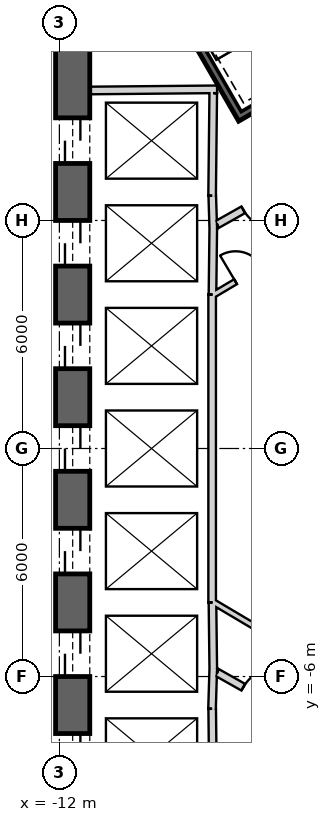
"""IFC4 building model, lengths in metres.
Left out: names, types, materials, properties, quantities, classifications, styles, units other than length and angle.
Written with IfcOpenShell. Run it as: python <this file> out.ifc"""

import sys

from ifc_helpers import new_model, si_unit, direction, frame, frame_2d, origin, place, context, subcontext, project, spatial, rectangle, extrude, element, fill, save


model = new_model("IFC4")
c1 = context("Model", 3, precision=1e-05, world=origin(), true_north=direction((0.0, 1.0)))
c2 = subcontext(c1, "Body", "Model", "MODEL_VIEW")
j1 = project(units=[si_unit("LENGTHUNIT", "METRE"), si_unit("PLANEANGLEUNIT", "RADIAN")], contexts=[c1])
p1 = place(None, origin())
s1 = spatial("IfcSite", under=j1, at=p1, CompositionType="ELEMENT")
p2 = place(p1, origin())
s2 = spatial("IfcBuilding", under=s1, at=p2, CompositionType="ELEMENT")
p3 = place(p2, origin())
s3 = spatial("IfcBuildingStorey", under=s2, at=p3, CompositionType="ELEMENT", Elevation=0.0)
p4 = place(p3, frame((19.475, 2.208, 0.0), z_axis=(0.0, 0.0, 1.0), x_axis=(-0.866028369851, 0.499994862586, 0.0)))
e1 = element("IfcWall", 1, at=p4, inside=s3, PredefinedType="SHEAR", context=c2, shape_type="SweptSolid", body=[
    extrude(rectangle(XDim=31.523, YDim=0.9, at=frame_2d((15.762, 0.0))), origin(), (0.0, 0.0, 1.0), 9.0),
])
p5 = place(p4, frame((7.062, 0.0, 0.0)))
e2 = element("IfcOpeningElement", 2, at=p5, cuts=e1, PredefinedType="OPENING", context=c2, shape_type="SweptSolid", body=[
    extrude(rectangle(XDim=1.2, YDim=2.4, at=frame_2d((0.6, 1.2))), frame((0.0, 0.46, 0.0), z_axis=(0.0, -1.0, 0.0), x_axis=(1.0, 0.0, 0.0)), (0.0, 0.0, 1.0), 0.92),
])
p6 = place(p4, frame((9.762, 0.0, 0.0)))
e3 = element("IfcOpeningElement", 3, at=p6, cuts=e1, PredefinedType="OPENING", context=c2, shape_type="SweptSolid", body=[
    extrude(rectangle(XDim=1.2, YDim=2.4, at=frame_2d((0.6, 1.2))), frame((0.0, 0.46, 0.0), z_axis=(0.0, -1.0, 0.0), x_axis=(1.0, 0.0, 0.0)), (0.0, 0.0, 1.0), 0.92),
])
p7 = place(p4, frame((12.462, 0.0, 0.0)))
e4 = element("IfcOpeningElement", 4, at=p7, cuts=e1, PredefinedType="OPENING", context=c2, shape_type="SweptSolid", body=[
    extrude(rectangle(XDim=1.2, YDim=2.4, at=frame_2d((0.6, 1.2))), frame((0.0, 0.46, 0.0), z_axis=(0.0, -1.0, 0.0), x_axis=(1.0, 0.0, 0.0)), (0.0, 0.0, 1.0), 0.92),
])
p8 = place(p4, frame((15.162, 0.0, 0.0)))
e5 = element("IfcOpeningElement", 5, at=p8, cuts=e1, PredefinedType="OPENING", context=c2, shape_type="SweptSolid", body=[
    extrude(rectangle(XDim=1.2, YDim=2.4, at=frame_2d((0.6, 1.2))), frame((0.0, 0.46, 0.0), z_axis=(0.0, -1.0, 0.0), x_axis=(1.0, 0.0, 0.0)), (0.0, 0.0, 1.0), 0.92),
])
p9 = place(p4, frame((17.862, 0.0, 0.0)))
e6 = element("IfcOpeningElement", 6, at=p9, cuts=e1, PredefinedType="OPENING", context=c2, shape_type="SweptSolid", body=[
    extrude(rectangle(XDim=1.2, YDim=2.4, at=frame_2d((0.6, 1.2))), frame((0.0, 0.46, 0.0), z_axis=(0.0, -1.0, 0.0), x_axis=(1.0, 0.0, 0.0)), (0.0, 0.0, 1.0), 0.92),
])
p10 = place(p4, frame((20.562, 0.0, 0.0)))
e7 = element("IfcOpeningElement", 7, at=p10, cuts=e1, PredefinedType="OPENING", context=c2, shape_type="SweptSolid", body=[
    extrude(rectangle(XDim=1.2, YDim=2.4, at=frame_2d((0.6, 1.2))), frame((0.0, 0.46, 0.0), z_axis=(0.0, -1.0, 0.0), x_axis=(1.0, 0.0, 0.0)), (0.0, 0.0, 1.0), 0.92),
])
p11 = place(p4, frame((23.262, 0.0, 0.0)))
e8 = element("IfcOpeningElement", 8, at=p11, cuts=e1, PredefinedType="OPENING", context=c2, shape_type="SweptSolid", body=[
    extrude(rectangle(XDim=1.2, YDim=2.4, at=frame_2d((0.6, 1.2))), frame((0.0, 0.46, 0.0), z_axis=(0.0, -1.0, 0.0), x_axis=(1.0, 0.0, 0.0)), (0.0, 0.0, 1.0), 0.92),
])
p12 = place(p4, frame((3.612, 0.0, 0.0)))
e9 = element("IfcOpeningElement", 9, at=p12, cuts=e1, PredefinedType="OPENING", context=c2, shape_type="SweptSolid", body=[
    extrude(rectangle(XDim=1.2, YDim=2.4, at=frame_2d((0.6, 1.2))), frame((0.0, 0.46, 0.0), z_axis=(0.0, -1.0, 0.0), x_axis=(1.0, 0.0, 0.0)), (0.0, 0.0, 1.0), 0.92),
])
p13 = place(p4, frame((26.712, 0.0, 0.0)))
e10 = element("IfcOpeningElement", 10, at=p13, cuts=e1, PredefinedType="OPENING", context=c2, shape_type="SweptSolid", body=[
    extrude(rectangle(XDim=1.2, YDim=2.4, at=frame_2d((0.6, 1.2))), frame((0.0, 0.46, 0.0), z_axis=(0.0, -1.0, 0.0), x_axis=(1.0, 0.0, 0.0)), (0.0, 0.0, 1.0), 0.92),
])
p14 = place(p3, frame((-11.65, 15.762, 0.0), z_axis=(0.0, 0.0, 1.0), x_axis=(0.0, -1.0, 0.0)))
e11 = element("IfcWall", 11, at=p14, inside=s3, PredefinedType="SHEAR", context=c2, shape_type="SweptSolid", body=[
    extrude(rectangle(XDim=31.523, YDim=0.9, at=frame_2d((15.762, 0.0))), origin(), (0.0, 0.0, 1.0), 9.0),
])
p15 = place(p14, frame((7.062, 0.0, 0.0)))
e12 = element("IfcOpeningElement", 12, at=p15, cuts=e11, PredefinedType="OPENING", context=c2, shape_type="SweptSolid", body=[
    extrude(rectangle(XDim=1.2, YDim=2.4, at=frame_2d((0.6, 1.2))), frame((0.0, 0.46, 0.0), z_axis=(0.0, -1.0, 0.0), x_axis=(1.0, 0.0, 0.0)), (0.0, 0.0, 1.0), 0.92),
])
p16 = place(p14, frame((9.762, 0.0, 0.0)))
e13 = element("IfcOpeningElement", 13, at=p16, cuts=e11, PredefinedType="OPENING", context=c2, shape_type="SweptSolid", body=[
    extrude(rectangle(XDim=1.2, YDim=2.4, at=frame_2d((0.6, 1.2))), frame((0.0, 0.46, 0.0), z_axis=(0.0, -1.0, 0.0), x_axis=(1.0, 0.0, 0.0)), (0.0, 0.0, 1.0), 0.92),
])
p17 = place(p14, frame((12.462, 0.0, 0.0)))
e14 = element("IfcOpeningElement", 14, at=p17, cuts=e11, PredefinedType="OPENING", context=c2, shape_type="SweptSolid", body=[
    extrude(rectangle(XDim=1.2, YDim=2.4, at=frame_2d((0.6, 1.2))), frame((0.0, 0.46, 0.0), z_axis=(0.0, -1.0, 0.0), x_axis=(1.0, 0.0, 0.0)), (0.0, 0.0, 1.0), 0.92),
])
p18 = place(p14, frame((15.162, 0.0, 0.0)))
e15 = element("IfcOpeningElement", 15, at=p18, cuts=e11, PredefinedType="OPENING", context=c2, shape_type="SweptSolid", body=[
    extrude(rectangle(XDim=1.2, YDim=2.4, at=frame_2d((0.6, 1.2))), frame((0.0, 0.46, 0.0), z_axis=(0.0, -1.0, 0.0), x_axis=(1.0, 0.0, 0.0)), (0.0, 0.0, 1.0), 0.92),
])
p19 = place(p14, frame((17.862, 0.0, 0.0)))
e16 = element("IfcOpeningElement", 16, at=p19, cuts=e11, PredefinedType="OPENING", context=c2, shape_type="SweptSolid", body=[
    extrude(rectangle(XDim=1.2, YDim=2.4, at=frame_2d((0.6, 1.2))), frame((0.0, 0.46, 0.0), z_axis=(0.0, -1.0, 0.0), x_axis=(1.0, 0.0, 0.0)), (0.0, 0.0, 1.0), 0.92),
])
p20 = place(p14, frame((20.562, 0.0, 0.0)))
e17 = element("IfcOpeningElement", 17, at=p20, cuts=e11, PredefinedType="OPENING", context=c2, shape_type="SweptSolid", body=[
    extrude(rectangle(XDim=1.2, YDim=2.4, at=frame_2d((0.6, 1.2))), frame((0.0, 0.46, 0.0), z_axis=(0.0, -1.0, 0.0), x_axis=(1.0, 0.0, 0.0)), (0.0, 0.0, 1.0), 0.92),
])
p21 = place(p14, frame((23.262, 0.0, 0.0)))
e18 = element("IfcOpeningElement", 18, at=p21, cuts=e11, PredefinedType="OPENING", context=c2, shape_type="SweptSolid", body=[
    extrude(rectangle(XDim=1.2, YDim=2.4, at=frame_2d((0.6, 1.2))), frame((0.0, 0.46, 0.0), z_axis=(0.0, -1.0, 0.0), x_axis=(1.0, 0.0, 0.0)), (0.0, 0.0, 1.0), 0.92),
])
p22 = place(p14, frame((3.612, 0.0, 0.0)))
e19 = element("IfcOpeningElement", 19, at=p22, cuts=e11, PredefinedType="OPENING", context=c2, shape_type="SweptSolid", body=[
    extrude(rectangle(XDim=1.2, YDim=2.4, at=frame_2d((0.6, 1.2))), frame((0.0, 0.46, 0.0), z_axis=(0.0, -1.0, 0.0), x_axis=(1.0, 0.0, 0.0)), (0.0, 0.0, 1.0), 0.92),
])
p23 = place(p14, frame((26.712, 0.0, 0.0)))
e20 = element("IfcOpeningElement", 20, at=p23, cuts=e11, PredefinedType="OPENING", context=c2, shape_type="SweptSolid", body=[
    extrude(rectangle(XDim=1.2, YDim=2.4, at=frame_2d((0.6, 1.2))), frame((0.0, 0.46, 0.0), z_axis=(0.0, -1.0, 0.0), x_axis=(1.0, 0.0, 0.0)), (0.0, 0.0, 1.0), 0.92),
])
p24 = place(p3, frame((-7.825, -17.97, 0.0), z_axis=(0.0, 0.0, 1.0), x_axis=(0.866028369851, 0.499994862586, 0.0)))
e21 = element("IfcWall", 21, at=p24, inside=s3, PredefinedType="SHEAR", context=c2, shape_type="SweptSolid", body=[
    extrude(rectangle(XDim=31.523, YDim=0.9, at=frame_2d((15.762, 0.0))), origin(), (0.0, 0.0, 1.0), 9.0),
])
p25 = place(p24, frame((7.062, 0.0, 0.0)))
e22 = element("IfcOpeningElement", 22, at=p25, cuts=e21, PredefinedType="OPENING", context=c2, shape_type="SweptSolid", body=[
    extrude(rectangle(XDim=1.2, YDim=2.4, at=frame_2d((0.6, 1.2))), frame((0.0, 0.46, 0.0), z_axis=(0.0, -1.0, 0.0), x_axis=(1.0, 0.0, 0.0)), (0.0, 0.0, 1.0), 0.92),
])
p26 = place(p24, frame((9.762, 0.0, 0.0)))
e23 = element("IfcOpeningElement", 23, at=p26, cuts=e21, PredefinedType="OPENING", context=c2, shape_type="SweptSolid", body=[
    extrude(rectangle(XDim=1.2, YDim=2.4, at=frame_2d((0.6, 1.2))), frame((0.0, 0.46, 0.0), z_axis=(0.0, -1.0, 0.0), x_axis=(1.0, 0.0, 0.0)), (0.0, 0.0, 1.0), 0.92),
])
p27 = place(p24, frame((12.462, 0.0, 0.0)))
e24 = element("IfcOpeningElement", 24, at=p27, cuts=e21, PredefinedType="OPENING", context=c2, shape_type="SweptSolid", body=[
    extrude(rectangle(XDim=1.2, YDim=2.4, at=frame_2d((0.6, 1.2))), frame((0.0, 0.46, 0.0), z_axis=(0.0, -1.0, 0.0), x_axis=(1.0, 0.0, 0.0)), (0.0, 0.0, 1.0), 0.92),
])
p28 = place(p24, frame((15.162, 0.0, 0.0)))
e25 = element("IfcOpeningElement", 25, at=p28, cuts=e21, PredefinedType="OPENING", context=c2, shape_type="SweptSolid", body=[
    extrude(rectangle(XDim=1.2, YDim=2.4, at=frame_2d((0.6, 1.2))), frame((0.0, 0.46, 0.0), z_axis=(0.0, -1.0, 0.0), x_axis=(1.0, 0.0, 0.0)), (0.0, 0.0, 1.0), 0.92),
])
p29 = place(p24, frame((17.862, 0.0, 0.0)))
e26 = element("IfcOpeningElement", 26, at=p29, cuts=e21, PredefinedType="OPENING", context=c2, shape_type="SweptSolid", body=[
    extrude(rectangle(XDim=1.2, YDim=2.4, at=frame_2d((0.6, 1.2))), frame((0.0, 0.46, 0.0), z_axis=(0.0, -1.0, 0.0), x_axis=(1.0, 0.0, 0.0)), (0.0, 0.0, 1.0), 0.92),
])
p30 = place(p24, frame((20.562, 0.0, 0.0)))
e27 = element("IfcOpeningElement", 27, at=p30, cuts=e21, PredefinedType="OPENING", context=c2, shape_type="SweptSolid", body=[
    extrude(rectangle(XDim=1.2, YDim=2.4, at=frame_2d((0.6, 1.2))), frame((0.0, 0.46, 0.0), z_axis=(0.0, -1.0, 0.0), x_axis=(1.0, 0.0, 0.0)), (0.0, 0.0, 1.0), 0.92),
])
p31 = place(p24, frame((26.712, 0.0, 0.0)))
e28 = element("IfcOpeningElement", 28, at=p31, cuts=e21, PredefinedType="OPENING", context=c2, shape_type="SweptSolid", body=[
    extrude(rectangle(XDim=1.2, YDim=2.4, at=frame_2d((0.6, 1.2))), frame((0.0, 0.46, 0.0), z_axis=(0.0, -1.0, 0.0), x_axis=(1.0, 0.0, 0.0)), (0.0, 0.0, 1.0), 0.92),
])
p32 = place(p24, frame((3.612, 0.0, 0.0)))
e29 = element("IfcOpeningElement", 29, at=p32, cuts=e21, PredefinedType="OPENING", context=c2, shape_type="SweptSolid", body=[
    extrude(rectangle(XDim=1.2, YDim=2.4, at=frame_2d((0.6, 1.2))), frame((0.0, 0.46, 0.0), z_axis=(0.0, -1.0, 0.0), x_axis=(1.0, 0.0, 0.0)), (0.0, 0.0, 1.0), 0.92),
])
p33 = place(p3, frame((-11.2, 9.42, 0.0), z_axis=(0.0, 0.0, 1.0), x_axis=(0.999957167047, 0.009255488683, 0.0)))
e30 = element("IfcWall", 30, at=p33, inside=s3, PredefinedType="PLUMBINGWALL", context=c2, shape_type="SweptSolid", body=[
    extrude(rectangle(XDim=3.35, YDim=0.2, at=frame_2d((1.675, 0.0))), origin(), (0.0, 0.0, 1.0), 8.7),
])
p34 = place(p3, frame((-7.951, 9.35, 0.0), z_axis=(0.0, 0.0, 1.0), x_axis=(-0.011120469654, -0.999938165666, 0.0)))
e31 = element("IfcWall", 31, at=p34, inside=s3, PredefinedType="PLUMBINGWALL", context=c2, shape_type="SweptSolid", body=[
    extrude(rectangle(XDim=2.7, YDim=0.2, at=frame_2d((1.35, 0.0))), origin(), (0.0, 0.0, 1.0), 8.7),
])
p35 = place(p3, frame((-7.977, 6.65, 0.0), z_axis=(0.0, 0.0, 1.0), x_axis=(0.030861509705, -0.999523670164, 0.0)))
e32 = element("IfcWall", 32, at=p35, inside=s3, PredefinedType="PLUMBINGWALL", context=c2, shape_type="SweptSolid", body=[
    extrude(rectangle(XDim=0.878, YDim=0.2, at=frame_2d((0.439, 0.0))), origin(), (0.0, 0.0, 1.0), 8.7),
])
p36 = place(p3, frame((-7.949, 5.895, 0.0), z_axis=(0.0, 0.0, 1.0), x_axis=(-0.012042535896, -0.999927486035, 0.0)))
e33 = element("IfcWall", 33, at=p36, inside=s3, PredefinedType="PLUMBINGWALL", context=c2, shape_type="SweptSolid", body=[
    extrude(rectangle(XDim=1.845, YDim=0.2, at=frame_2d((0.922, 0.0))), origin(), (0.0, 0.0, 1.0), 8.7),
])
p37 = place(p3, frame((-7.98, 4.05, 0.0), z_axis=(0.0, 0.0, 1.0), x_axis=(0.0, -1.0, 0.0)))
e34 = element("IfcWall", 34, at=p37, inside=s3, PredefinedType="PLUMBINGWALL", context=c2, shape_type="SweptSolid", body=[
    extrude(rectangle(XDim=8.1, YDim=0.2, at=frame_2d((4.05, 0.0))), origin(), (0.0, 0.0, 1.0), 8.7),
])
p38 = place(p3, frame((-7.95, -5.772, 0.0), z_axis=(0.0, 0.0, 1.0), x_axis=(-0.030803413295, -0.999525462272, 0.0)))
e35 = element("IfcWall", 35, at=p38, inside=s3, PredefinedType="PLUMBINGWALL", context=c2, shape_type="SweptSolid", body=[
    extrude(rectangle(XDim=1.078, YDim=0.2, at=frame_2d((0.539, 0.0))), origin(), (0.0, 0.0, 1.0), 8.7),
])
p39 = place(p3, frame((-7.971, -4.05, 0.0), z_axis=(0.0, 0.0, 1.0), x_axis=(0.012042535896, -0.999927486035, 0.0)))
e36 = element("IfcWall", 36, at=p39, inside=s3, PredefinedType="PLUMBINGWALL", context=c2, shape_type="SweptSolid", body=[
    extrude(rectangle(XDim=1.845, YDim=0.2, at=frame_2d((0.922, 0.0))), origin(), (0.0, 0.0, 1.0), 8.7),
])
p40 = place(p3, frame((-7.979, -6.85, 0.0), z_axis=(0.0, 0.0, 1.0), x_axis=(0.011121475088, -0.999938154483, 0.0)))
e37 = element("IfcWall", 37, at=p40, inside=s3, PredefinedType="PLUMBINGWALL", context=c2, shape_type="SweptSolid", body=[
    extrude(rectangle(XDim=2.7, YDim=0.2, at=frame_2d((1.35, 0.0))), origin(), (0.0, 0.0, 1.0), 8.7),
])
p41 = place(p3, frame((-11.245, 15.678, -0.4), z_axis=(0.0, 0.0, 1.0), x_axis=(0.499977274689, -0.866038523851, 0.0)))
e38 = element("IfcWall", 38, at=p41, inside=s3, PredefinedType="SHEAR", context=c2, shape_type="SweptSolid", body=[
    extrude(rectangle(XDim=8.1, YDim=0.2, at=frame_2d((4.05, 0.0))), origin(), (0.0, 0.0, 1.0), 9.1),
])
p42 = place(p3, frame((-7.159, 8.8, -0.4), z_axis=(0.0, 0.0, 1.0), x_axis=(0.866047807691, 0.499961193289, 0.0)))
e39 = element("IfcWall", 39, at=p42, inside=s3, PredefinedType="SHEAR", context=c2, shape_type="SweptSolid", body=[
    extrude(rectangle(XDim=3.6, YDim=0.2, at=frame_2d((1.8, 0.0))), origin(), (0.0, 0.0, 1.0), 9.1),
])
p43 = place(p42, frame((1.25, 0.0, 0.4)))
e40 = element("IfcOpeningElement", 40, at=p43, cuts=e39, PredefinedType="OPENING", context=c2, shape_type="SweptSolid", body=[
    extrude(rectangle(XDim=1.1, YDim=2.1, at=frame_2d((0.55, 1.05))), frame((0.0, 0.11, 0.0), z_axis=(0.0, -1.0, 0.0), x_axis=(1.0, 0.0, 0.0)), (0.0, 0.0, 1.0), 0.22),
])
p44 = place(p3, frame((-5.6, 7.16, 0.0), z_axis=(0.0, 0.0, 1.0), x_axis=(-0.871363259478, -0.490638431059, 0.0)))
e41 = element("IfcWall", 41, at=p44, inside=s3, PredefinedType="PARTITIONING", context=c2, shape_type="SweptSolid", body=[
    extrude(rectangle(XDim=2.581, YDim=0.2, at=frame_2d((1.291, 0.0))), origin(), (0.0, 0.0, 1.0), 8.7),
])
p45 = place(p44, frame((0.791, 0.0, 0.0)))
e42 = element("IfcOpeningElement", 42, at=p45, cuts=e41, PredefinedType="OPENING", context=c2, shape_type="SweptSolid", body=[
    extrude(rectangle(XDim=1.0, YDim=2.1, at=frame_2d((0.5, 1.05))), frame((0.0, 0.11, 0.0), z_axis=(0.0, -1.0, 0.0), x_axis=(1.0, 0.0, 0.0)), (0.0, 0.0, 1.0), 0.22),
])
p46 = place(p3, frame((-7.849, -5.894, 0.0), z_axis=(0.0, 0.0, 1.0), x_axis=(0.871363259478, -0.490638431059, 0.0)))
e43 = element("IfcWall", 43, at=p46, inside=s3, PredefinedType="PARTITIONING", context=c2, shape_type="SweptSolid", body=[
    extrude(rectangle(XDim=2.581, YDim=0.2, at=frame_2d((1.291, 0.0))), origin(), (0.0, 0.0, 1.0), 8.7),
])
p47 = place(p46, frame((0.791, 0.0, 0.0)))
e44 = element("IfcOpeningElement", 44, at=p47, cuts=e43, PredefinedType="OPENING", context=c2, shape_type="SweptSolid", body=[
    extrude(rectangle(XDim=1.0, YDim=2.1, at=frame_2d((0.5, 1.05))), frame((0.0, 0.11, 0.0), z_axis=(0.0, -1.0, 0.0), x_axis=(1.0, 0.0, 0.0)), (0.0, 0.0, 1.0), 0.22),
])
p48 = place(p3, frame((-7.95, -4.041, 0.0), z_axis=(0.0, 0.0, 1.0), x_axis=(0.860090281069, -0.510141851263, 0.0)))
e45 = element("IfcWall", 45, at=p48, inside=s3, PredefinedType="PLUMBINGWALL", context=c2, shape_type="SweptSolid", body=[
    extrude(rectangle(XDim=2.089, YDim=0.15, at=frame_2d((1.045, 0.0))), origin(), (0.0, 0.0, 1.0), 8.7),
])
p49 = place(p3, frame((-6.024, 5.183, 0.0), z_axis=(0.0, 0.0, 1.0), x_axis=(-0.860126804455, -0.510080268447, 0.0)))
e46 = element("IfcWall", 46, at=p49, inside=s3, PredefinedType="PLUMBINGWALL", context=c2, shape_type="SweptSolid", body=[
    extrude(rectangle(XDim=2.24, YDim=0.15, at=frame_2d((1.12, 0.0))), origin(), (0.0, 0.0, 1.0), 8.7),
])
p50 = place(p49, frame((0.757, 0.0, 0.0)))
e47 = element("IfcOpeningElement", 47, at=p50, cuts=e46, PredefinedType="OPENING", context=c2, shape_type="SweptSolid", body=[
    extrude(rectangle(XDim=0.8, YDim=2.1, at=frame_2d((0.4, 1.05))), frame((0.0, 0.085, 0.0), z_axis=(0.0, -1.0, 0.0), x_axis=(1.0, 0.0, 0.0)), (0.0, 0.0, 1.0), 0.17),
])
p51 = place(p45, origin())
e48 = element("IfcDoor", 48, at=p51, inside=s3, OperationType="SINGLE_SWING_LEFT", PredefinedType="USERDEFINED", context=c2, shape_type="SweptSolid", body=[
    extrude(rectangle(XDim=1.0, YDim=2.1, at=frame_2d((0.5, 1.05))), frame((0.0, 0.025, 0.0), z_axis=(0.0, -1.0, 0.0), x_axis=(1.0, 0.0, 0.0)), (0.0, 0.0, 1.0), 0.05),
])
fill(e42, e48)
p52 = place(p47, origin())
e49 = element("IfcDoor", 49, at=p52, inside=s3, OperationType="SINGLE_SWING_RIGHT", PredefinedType="USERDEFINED", context=c2, shape_type="SweptSolid", body=[
    extrude(rectangle(XDim=1.0, YDim=2.1, at=frame_2d((0.5, 1.05))), frame((0.0, 0.025, 0.0), z_axis=(0.0, -1.0, 0.0), x_axis=(1.0, 0.0, 0.0)), (0.0, 0.0, 1.0), 0.05),
])
fill(e44, e49)
p53 = place(p50, origin())
e50 = element("IfcDoor", 50, at=p53, inside=s3, OperationType="SINGLE_SWING_RIGHT", PredefinedType="USERDEFINED", context=c2, shape_type="SweptSolid", body=[
    extrude(rectangle(XDim=0.8, YDim=2.1, at=frame_2d((0.4, 1.05))), frame((0.0, 0.025, 0.0), z_axis=(0.0, -1.0, 0.0), x_axis=(1.0, 0.0, 0.0)), (0.0, 0.0, 1.0), 0.05),
])
fill(e47, e50)
p54 = place(p15, origin())
e51 = element("IfcDoor", 51, at=p54, inside=s3, OperationType="SLIDING_TO_LEFT", PredefinedType="USERDEFINED", context=c2, shape_type="SweptSolid", body=[
    extrude(rectangle(XDim=1.2, YDim=2.4, at=frame_2d((0.6, 1.2))), frame((0.0, 0.025, 0.0), z_axis=(0.0, -1.0, 0.0), x_axis=(1.0, 0.0, 0.0)), (0.0, 0.0, 1.0), 0.05),
])
fill(e12, e51)
p55 = place(p16, origin())
e52 = element("IfcDoor", 52, at=p55, inside=s3, OperationType="SLIDING_TO_LEFT", PredefinedType="USERDEFINED", context=c2, shape_type="SweptSolid", body=[
    extrude(rectangle(XDim=1.2, YDim=2.4, at=frame_2d((0.6, 1.2))), frame((0.0, 0.025, 0.0), z_axis=(0.0, -1.0, 0.0), x_axis=(1.0, 0.0, 0.0)), (0.0, 0.0, 1.0), 0.05),
])
fill(e13, e52)
p56 = place(p17, origin())
e53 = element("IfcDoor", 53, at=p56, inside=s3, OperationType="SLIDING_TO_LEFT", PredefinedType="USERDEFINED", context=c2, shape_type="SweptSolid", body=[
    extrude(rectangle(XDim=1.2, YDim=2.4, at=frame_2d((0.6, 1.2))), frame((0.0, 0.025, 0.0), z_axis=(0.0, -1.0, 0.0), x_axis=(1.0, 0.0, 0.0)), (0.0, 0.0, 1.0), 0.05),
])
fill(e14, e53)
p57 = place(p18, origin())
e54 = element("IfcDoor", 54, at=p57, inside=s3, OperationType="SLIDING_TO_LEFT", PredefinedType="USERDEFINED", context=c2, shape_type="SweptSolid", body=[
    extrude(rectangle(XDim=1.2, YDim=2.4, at=frame_2d((0.6, 1.2))), frame((0.0, 0.025, 0.0), z_axis=(0.0, -1.0, 0.0), x_axis=(1.0, 0.0, 0.0)), (0.0, 0.0, 1.0), 0.05),
])
fill(e15, e54)
p58 = place(p19, origin())
e55 = element("IfcDoor", 55, at=p58, inside=s3, OperationType="SLIDING_TO_LEFT", PredefinedType="USERDEFINED", context=c2, shape_type="SweptSolid", body=[
    extrude(rectangle(XDim=1.2, YDim=2.4, at=frame_2d((0.6, 1.2))), frame((0.0, 0.025, 0.0), z_axis=(0.0, -1.0, 0.0), x_axis=(1.0, 0.0, 0.0)), (0.0, 0.0, 1.0), 0.05),
])
fill(e16, e55)
p59 = place(p20, origin())
e56 = element("IfcDoor", 56, at=p59, inside=s3, OperationType="SLIDING_TO_LEFT", PredefinedType="USERDEFINED", context=c2, shape_type="SweptSolid", body=[
    extrude(rectangle(XDim=1.2, YDim=2.4, at=frame_2d((0.6, 1.2))), frame((0.0, 0.025, 0.0), z_axis=(0.0, -1.0, 0.0), x_axis=(1.0, 0.0, 0.0)), (0.0, 0.0, 1.0), 0.05),
])
fill(e17, e56)
p60 = place(p21, origin())
e57 = element("IfcDoor", 57, at=p60, inside=s3, OperationType="SLIDING_TO_LEFT", PredefinedType="USERDEFINED", context=c2, shape_type="SweptSolid", body=[
    extrude(rectangle(XDim=1.2, YDim=2.4, at=frame_2d((0.6, 1.2))), frame((0.0, 0.025, 0.0), z_axis=(0.0, -1.0, 0.0), x_axis=(1.0, 0.0, 0.0)), (0.0, 0.0, 1.0), 0.05),
])
fill(e18, e57)
save(model, sys.argv[1])
